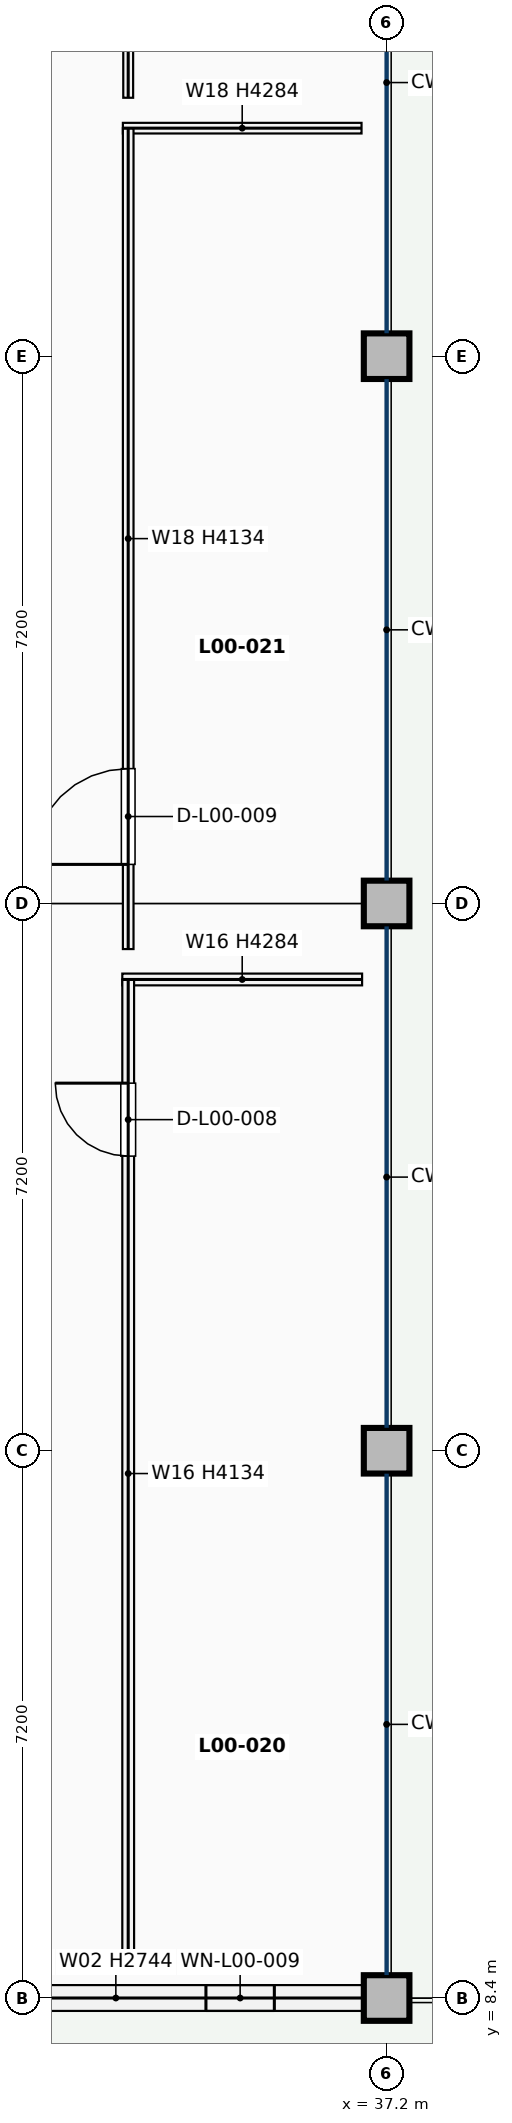
"""IFC4 building model, lengths in metres.
Left out: names, types, materials, properties, quantities, classifications, styles, units other than length and angle.
Written with IfcOpenShell. Run it as: python <this file> out.ifc"""

import sys

from ifc_helpers import new_model, si_unit, direction, frame, frame_2d, origin, origin_2d, place, context, subcontext, project, spatial, rectangle, extrude, element, fill, save


model = new_model("IFC4")
c1 = context("Model", 3, precision=1e-05, world=origin(), true_north=direction((0.0, 1.0)))
c2 = subcontext(c1, "Body", "Model", "MODEL_VIEW")
j1 = project(units=[si_unit("LENGTHUNIT", "METRE"), si_unit("PLANEANGLEUNIT", "RADIAN")], contexts=[c1])
p1 = place(None, origin())
s1 = spatial("IfcSite", under=j1, at=p1, CompositionType="ELEMENT")
p2 = place(p1, origin())
s2 = spatial("IfcBuilding", under=s1, at=p2, CompositionType="ELEMENT")
p3 = place(p2, origin())
s3 = spatial("IfcBuildingStorey", under=s2, at=p3, CompositionType="ELEMENT", Elevation=0.0)
for number, where, z_axis, x_axis in (
    (1, (37.2, 8.4, 0.0), (0.0, 0.0, 1.0), (1.0, 0.0, 0.0)),
    (2, (37.2, 15.6, 0.0), (0.0, 0.0, 1.0), (1.0, 0.0, 0.0)),
    (3, (37.2, 22.8, 0.0), (0.0, 0.0, 1.0), (1.0, 0.0, 0.0)),
    (4, (37.2, 30.0, 0.0), (0.0, 0.0, 1.0), (1.0, 0.0, 0.0)),
):
    element("IfcColumn", number, at=place(p3, frame(where, z_axis=z_axis, x_axis=x_axis)), inside=s3, PredefinedType="COLUMN", context=c2, shape_type="SweptSolid", body=[
        extrude(rectangle(XDim=0.6, YDim=0.6, at=origin_2d()), origin(), (0.0, 0.0, 1.0), 5.1),
    ])
p4 = place(p3, frame((30.377, 8.4, 0.0), z_axis=(0.0, 0.0, 1.0), x_axis=(1.0, 0.0, 0.0)))
e5 = element("IfcWall", 5, at=p4, inside=s3, PredefinedType="SOLIDWALL", context=c2, shape_type="SweptSolid", body=[
    extrude(rectangle(XDim=6.521, YDim=0.34, at=frame_2d((3.26, 0.0))), origin(), (0.0, 0.0, 1.0), 2.744),
])
p5 = place(p4, frame((1.175, 0.0, 0.75)))
e6 = element("IfcOpeningElement", 6, at=p5, cuts=e5, PredefinedType="OPENING", context=c2, shape_type="SweptSolid", body=[
    extrude(rectangle(XDim=0.9, YDim=1.75, at=frame_2d((0.45, 0.875))), frame((0.0, 0.18, 0.0), z_axis=(0.0, -1.0, 0.0), x_axis=(1.0, 0.0, 0.0)), (0.0, 0.0, 1.0), 0.36),
])
p6 = place(p4, frame((4.446, 0.0, 0.75)))
e7 = element("IfcOpeningElement", 7, at=p6, cuts=e5, PredefinedType="OPENING", context=c2, shape_type="SweptSolid", body=[
    extrude(rectangle(XDim=0.9, YDim=1.75, at=frame_2d((0.45, 0.875))), frame((0.0, 0.18, 0.0), z_axis=(0.0, -1.0, 0.0), x_axis=(1.0, 0.0, 0.0)), (0.0, 0.0, 1.0), 0.36),
])
p7 = place(p3, frame((33.722, 21.8, 0.0), z_axis=(0.0, 0.0, 1.0), x_axis=(1.0, 0.0, 0.0)))
e8 = element("IfcWall", 8, at=p7, inside=s3, PredefinedType="PARTITIONING", context=c2, shape_type="SweptSolid", body=[
    extrude(rectangle(XDim=3.155, YDim=0.155, at=frame_2d((1.578, 0.0))), origin(), (0.0, 0.0, 1.0), 4.284),
])
p8 = place(p3, frame((33.8, 8.8, 0.0), z_axis=(0.0, 0.0, 1.0), x_axis=(0.0, 1.0, 0.0)))
e9 = element("IfcWall", 9, at=p8, inside=s3, PredefinedType="PARTITIONING", context=c2, shape_type="SweptSolid", body=[
    extrude(rectangle(XDim=13.0, YDim=0.155, at=frame_2d((6.5, 0.0))), origin(), (0.0, 0.0, 1.0), 4.134),
])
p9 = place(p8, frame((10.676, 0.0, 0.0)))
e10 = element("IfcOpeningElement", 10, at=p9, cuts=e9, PredefinedType="OPENING", context=c2, shape_type="SweptSolid", body=[
    extrude(rectangle(XDim=0.96, YDim=2.14, at=frame_2d((0.48, 1.07))), frame((0.0, 0.087, 0.0), z_axis=(0.0, -1.0, 0.0), x_axis=(1.0, 0.0, 0.0)), (0.0, 0.0, 1.0), 0.175),
])
p10 = place(p3, frame((33.73, 33.0, 0.0), z_axis=(0.0, 0.0, 1.0), x_axis=(1.0, 0.0, 0.0)))
e11 = element("IfcWall", 11, at=p10, inside=s3, PredefinedType="PARTITIONING", context=c2, shape_type="SweptSolid", body=[
    extrude(rectangle(XDim=3.14, YDim=0.14, at=frame_2d((1.57, 0.0))), origin(), (0.0, 0.0, 1.0), 4.284),
])
p11 = place(p3, frame((33.8, 22.2, 0.0), z_axis=(0.0, 0.0, 1.0), x_axis=(0.0, 1.0, 0.0)))
e12 = element("IfcWall", 12, at=p11, inside=s3, PredefinedType="PARTITIONING", context=c2, shape_type="SweptSolid", body=[
    extrude(rectangle(XDim=10.8, YDim=0.14, at=frame_2d((5.4, 0.0))), origin(), (0.0, 0.0, 1.0), 4.134),
])
p12 = place(p11, frame((1.114, 0.0, 0.0)))
e13 = element("IfcOpeningElement", 13, at=p12, cuts=e12, PredefinedType="OPENING", context=c2, shape_type="SweptSolid", body=[
    extrude(rectangle(XDim=1.26, YDim=2.26, at=frame_2d((0.63, 1.13))), frame((0.0, 0.08, 0.0), z_axis=(0.0, -1.0, 0.0), x_axis=(1.0, 0.0, 0.0)), (0.0, 0.0, 1.0), 0.16),
])
p13 = place(p3, frame((33.8, 33.4, 0.0), z_axis=(0.0, 0.0, 1.0), x_axis=(0.0, 1.0, 0.0)))
e14 = element("IfcWall", 14, at=p13, inside=s3, PredefinedType="PARTITIONING", context=c2, shape_type="SweptSolid", body=[
    extrude(rectangle(XDim=10.6, YDim=0.13, at=frame_2d((5.3, 0.0))), origin(), (0.0, 0.0, 1.0), 4.134),
])
p14 = place(p13, frame((4.61, 0.0, 0.0)))
e15 = element("IfcOpeningElement", 15, at=p14, cuts=e14, PredefinedType="OPENING", context=c2, shape_type="SweptSolid", body=[
    extrude(rectangle(XDim=1.38, YDim=2.28, at=frame_2d((0.69, 1.14))), frame((0.0, 0.075, 0.0), z_axis=(0.0, -1.0, 0.0), x_axis=(1.0, 0.0, 0.0)), (0.0, 0.0, 1.0), 0.15),
])
p15 = place(p6, origin())
e16 = element("IfcWindow", 16, at=p15, inside=s3, PartitioningType="SINGLE_PANEL", PredefinedType="WINDOW", context=c2, shape_type="SweptSolid", body=[
    extrude(rectangle(XDim=0.9, YDim=1.75, at=frame_2d((0.45, 0.875))), frame((0.0, 0.03, 0.0), z_axis=(0.0, -1.0, 0.0), x_axis=(1.0, 0.0, 0.0)), (0.0, 0.0, 1.0), 0.06),
])
fill(e7, e16)
p16 = place(p9, origin())
e17 = element("IfcDoor", 17, at=p16, inside=s3, OperationType="SINGLE_SWING_RIGHT", PredefinedType="DOOR", context=c2, shape_type="SweptSolid", body=[
    extrude(rectangle(XDim=0.96, YDim=2.14, at=frame_2d((0.48, 1.07))), frame((0.0, 0.025, 0.0), z_axis=(0.0, -1.0, 0.0), x_axis=(1.0, 0.0, 0.0)), (0.0, 0.0, 1.0), 0.05),
])
fill(e10, e17)
p17 = place(p12, origin())
e18 = element("IfcDoor", 18, at=p17, inside=s3, OperationType="SINGLE_SWING_LEFT", PredefinedType="DOOR", context=c2, shape_type="SweptSolid", body=[
    extrude(rectangle(XDim=1.26, YDim=2.26, at=frame_2d((0.63, 1.13))), frame((0.0, 0.025, 0.0), z_axis=(0.0, -1.0, 0.0), x_axis=(1.0, 0.0, 0.0)), (0.0, 0.0, 1.0), 0.05),
])
fill(e13, e18)
save(model, sys.argv[1])
